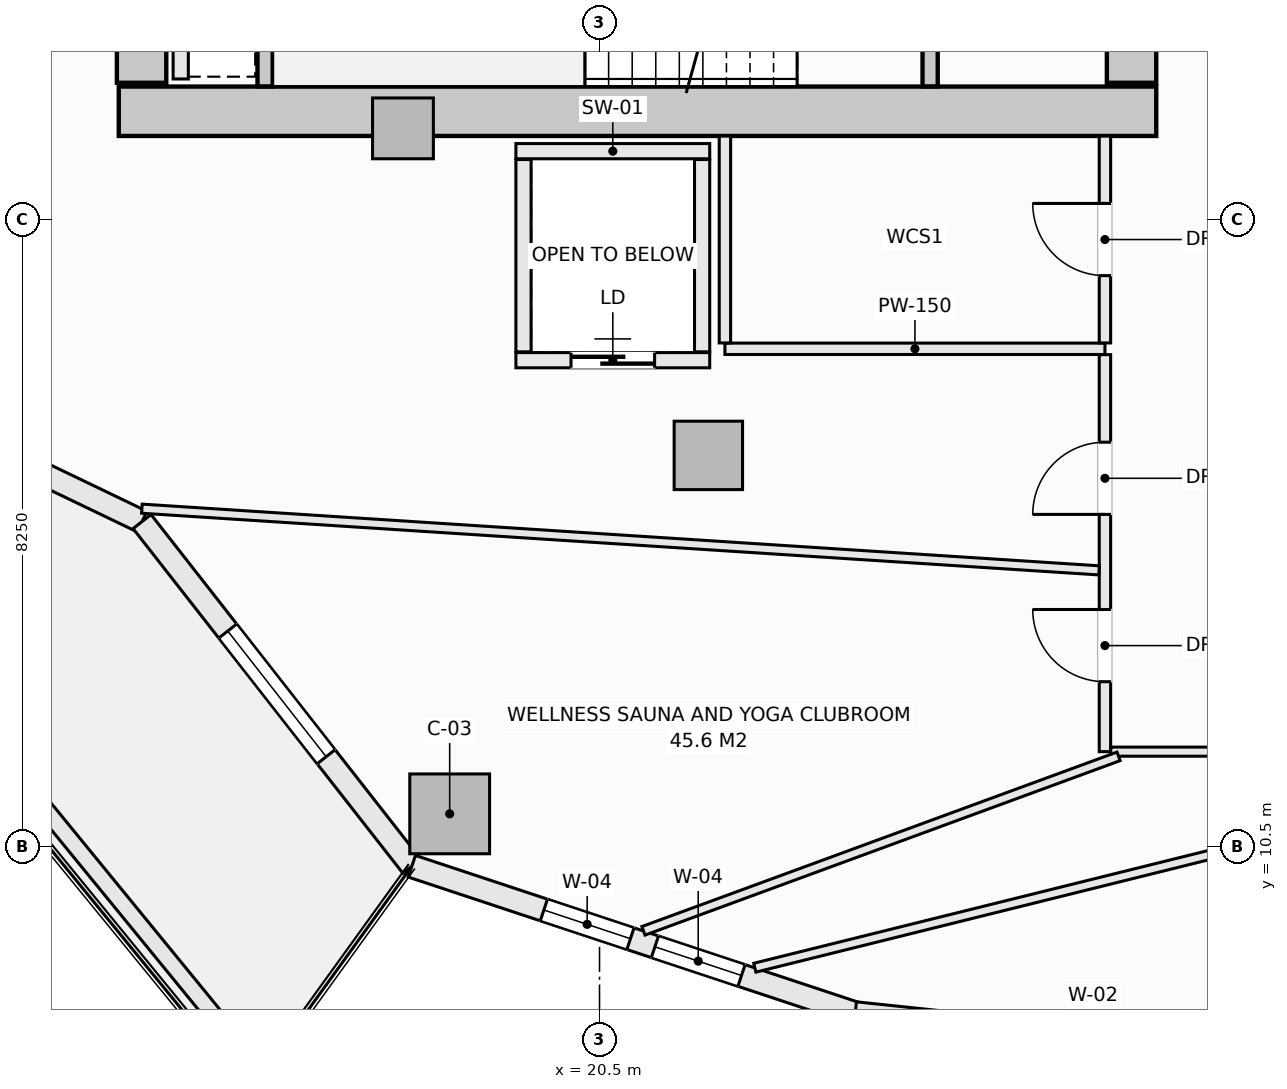
"""IFC4 building model, lengths in metres.
Left out: names, types, materials, properties, quantities, classifications, styles, units other than length and angle.
Written with IfcOpenShell. Run it as: python <this file> out.ifc"""

import sys

from ifc_helpers import new_model, si_unit, direction, frame, frame_2d, origin, origin_2d, place, context, subcontext, project, spatial, rectangle, extrude, element, fill, save


model = new_model("IFC4")
c1 = context("Model", 3, precision=1e-05, world=origin(), true_north=direction((0.0, 1.0)))
c2 = subcontext(c1, "Body", "Model", "MODEL_VIEW")
j1 = project(units=[si_unit("LENGTHUNIT", "METRE"), si_unit("PLANEANGLEUNIT", "RADIAN")], contexts=[c1])
p1 = place(None, origin())
s1 = spatial("IfcSite", under=j1, at=p1, CompositionType="ELEMENT")
p2 = place(p1, origin())
s2 = spatial("IfcBuilding", under=s1, at=p2, CompositionType="ELEMENT")
p3 = place(p2, frame((0.0, 0.0, 132.5)))
s3 = spatial("IfcBuildingStorey", under=s2, at=p3, CompositionType="ELEMENT", Elevation=132.5)
p4 = place(p3, frame((14.175, 20.175, -0.27), z_axis=(0.0, 0.0, 1.0), x_axis=(1.0, 0.0, 0.0)))
e1 = element("IfcWall", 1, at=p4, inside=s3, PredefinedType="SHEAR", context=c2, shape_type="SweptSolid", body=[
    extrude(rectangle(XDim=13.65, YDim=0.65, at=frame_2d((6.825, 0.0))), origin(), (0.0, 0.0, 1.0), 3.4),
])
p5 = place(p3, frame((14.475, 20.55, -0.27), z_axis=(0.0, 0.0, 1.0), x_axis=(0.0, 1.0, 0.0)))
e2 = element("IfcWall", 2, at=p5, inside=s3, PredefinedType="SHEAR", context=c2, shape_type="SweptSolid", body=[
    extrude(rectangle(XDim=12.9, YDim=0.65, at=frame_2d((6.45, 0.0))), origin(), (0.0, 0.0, 1.0), 3.4),
])
p6 = place(p3, frame((27.5, 20.55, -0.27), z_axis=(0.0, 0.0, 1.0), x_axis=(0.0, 1.0, 0.0)))
e3 = element("IfcWall", 3, at=p6, inside=s3, PredefinedType="SHEAR", context=c2, shape_type="SweptSolid", body=[
    extrude(rectangle(XDim=1.5, YDim=0.65, at=frame_2d((0.75, 0.0))), origin(), (0.0, 0.0, 1.0), 3.4),
])
p7 = place(p3, frame((18.529, 10.932, -0.27), z_axis=(0.0, 0.0, 1.0), x_axis=(1.0, 0.0, 0.0)))
e4 = element("IfcColumn", 4, at=p7, inside=s3, PredefinedType="COLUMN", context=c2, shape_type="SweptSolid", body=[
    extrude(rectangle(XDim=1.05, YDim=1.05, at=origin_2d()), origin(), (0.0, 0.0, 1.0), 3.4),
])
p8 = place(p3, frame((21.932, 15.648, -0.27), z_axis=(0.0, 0.0, 1.0), x_axis=(1.0, 0.0, 0.0)))
e5 = element("IfcColumn", 5, at=p8, inside=s3, PredefinedType="COLUMN", context=c2, shape_type="SweptSolid", body=[
    extrude(rectangle(XDim=0.9, YDim=0.9, at=origin_2d()), origin(), (0.0, 0.0, 1.0), 3.4),
])
p9 = place(p3, frame((17.914, 19.95, -0.27), z_axis=(0.0, 0.0, 1.0), x_axis=(1.0, 0.0, 0.0)))
e6 = element("IfcColumn", 6, at=p9, inside=s3, PredefinedType="PILASTER", context=c2, shape_type="SweptSolid", body=[
    extrude(rectangle(XDim=0.8, YDim=0.8, at=origin_2d()), origin(), (0.0, 0.0, 1.0), 3.4),
])
p10 = place(p3, frame((9.178, 17.325, 0.0), z_axis=(0.0, 0.0, 1.0), x_axis=(0.901370184739, -0.433049408339, 0.0)))
e7 = element("IfcWall", 7, at=p10, inside=s3, PredefinedType="SOLIDWALL", context=c2, shape_type="SweptSolid", body=[
    extrude(rectangle(XDim=5.884, YDim=0.3, at=frame_2d((2.942, 0.0))), origin(), (0.0, 0.0, 1.0), 2.653),
])
p11 = place(p10, frame((2.042, 0.0, 0.0)))
e8 = element("IfcOpeningElement", 8, at=p11, cuts=e7, PredefinedType="OPENING", context=c2, shape_type="SweptSolid", body=[
    extrude(rectangle(XDim=1.8, YDim=2.25, at=frame_2d((0.9, 1.125))), frame((0.0, 0.16, 0.0), z_axis=(0.0, -1.0, 0.0), x_axis=(1.0, 0.0, 0.0)), (0.0, 0.0, 1.0), 0.32),
])
p12 = place(p3, frame((14.481, 14.777, 0.0), z_axis=(0.0, 0.0, 1.0), x_axis=(0.616435134162, -0.787405693001, 0.0)))
e9 = element("IfcWall", 9, at=p12, inside=s3, PredefinedType="SOLIDWALL", context=c2, shape_type="SweptSolid", body=[
    extrude(rectangle(XDim=5.759, YDim=0.3, at=frame_2d((2.879, 0.0))), origin(), (0.0, 0.0, 1.0), 2.653),
])
p13 = place(p12, frame((1.829, 0.0, 0.74)))
e10 = element("IfcOpeningElement", 10, at=p13, cuts=e9, PredefinedType="OPENING", context=c2, shape_type="SweptSolid", body=[
    extrude(rectangle(XDim=2.1, YDim=1.7, at=frame_2d((1.05, 0.85))), frame((0.0, 0.16, 0.0), z_axis=(0.0, -1.0, 0.0), x_axis=(1.0, 0.0, 0.0)), (0.0, 0.0, 1.0), 0.32),
])
p14 = place(p3, frame((18.031, 10.242, 0.0), z_axis=(0.0, 0.0, 1.0), x_axis=(0.949238009374, -0.314558741032, 0.0)))
e11 = element("IfcWall", 11, at=p14, inside=s3, PredefinedType="SOLIDWALL", context=c2, shape_type="SweptSolid", body=[
    extrude(rectangle(XDim=6.146, YDim=0.3, at=frame_2d((3.073, 0.0))), origin(), (0.0, 0.0, 1.0), 2.653),
])
p15 = place(p14, frame((1.83, 0.0, 0.74)))
e12 = element("IfcOpeningElement", 12, at=p15, cuts=e11, PredefinedType="OPENING", context=c2, shape_type="SweptSolid", body=[
    extrude(rectangle(XDim=1.2, YDim=1.7, at=frame_2d((0.6, 0.85))), frame((0.0, 0.16, 0.0), z_axis=(0.0, -1.0, 0.0), x_axis=(1.0, 0.0, 0.0)), (0.0, 0.0, 1.0), 0.32),
])
p16 = place(p14, frame((3.369, 0.0, 0.74)))
e13 = element("IfcOpeningElement", 13, at=p16, cuts=e11, PredefinedType="OPENING", context=c2, shape_type="SweptSolid", body=[
    extrude(rectangle(XDim=1.2, YDim=1.7, at=frame_2d((0.6, 0.85))), frame((0.0, 0.16, 0.0), z_axis=(0.0, -1.0, 0.0), x_axis=(1.0, 0.0, 0.0)), (0.0, 0.0, 1.0), 0.32),
])
p17 = place(p3, frame((23.865, 8.309, 0.0), z_axis=(0.0, 0.0, 1.0), x_axis=(0.994498012394, -0.104755445421, 0.0)))
e14 = element("IfcWall", 14, at=p17, inside=s3, PredefinedType="SOLIDWALL", context=c2, shape_type="SweptSolid", body=[
    extrude(rectangle(XDim=6.295, YDim=0.3, at=frame_2d((3.147, 0.0))), origin(), (0.0, 0.0, 1.0), 2.653),
])
p18 = place(p17, frame((2.097, 0.0, 0.74)))
e15 = element("IfcOpeningElement", 15, at=p18, cuts=e14, PredefinedType="OPENING", context=c2, shape_type="SweptSolid", body=[
    extrude(rectangle(XDim=2.1, YDim=1.7, at=frame_2d((1.05, 0.85))), frame((0.0, 0.16, 0.0), z_axis=(0.0, -1.0, 0.0), x_axis=(1.0, 0.0, 0.0)), (0.0, 0.0, 1.0), 0.32),
])
p19 = place(p3, frame((11.791, 12.726, 0.0), z_axis=(0.0, 0.0, 1.0), x_axis=(0.633002467947, -0.77414977593, 0.0)))
e16 = element("IfcWall", 16, at=p19, inside=s3, PredefinedType="PARAPET", context=c2, shape_type="SweptSolid", body=[
    extrude(rectangle(XDim=6.78, YDim=0.22, at=frame_2d((3.39, 0.0))), origin(), (0.0, 0.0, 1.0), 0.52),
])
p20 = place(p3, frame((24.85, 20.502, -0.27), z_axis=(0.0, 0.0, 1.0), x_axis=(0.0, 1.0, 0.0)))
e17 = element("IfcWall", 17, at=p20, inside=s3, PredefinedType="SHEAR", context=c2, shape_type="SweptSolid", body=[
    extrude(rectangle(XDim=3.038, YDim=0.2, at=frame_2d((1.519, 0.0))), origin(), (0.0, 0.0, 1.0), 3.4),
])
p21 = place(p20, frame((0.969, 0.0, 0.27)))
e18 = element("IfcOpeningElement", 18, at=p21, cuts=e17, PredefinedType="OPENING", context=c2, shape_type="SweptSolid", body=[
    extrude(rectangle(XDim=1.1, YDim=2.15, at=frame_2d((0.55, 1.075))), frame((0.0, 0.11, 0.0), z_axis=(0.0, -1.0, 0.0), x_axis=(1.0, 0.0, 0.0)), (0.0, 0.0, 1.0), 0.22),
])
p22 = place(p3, frame((16.1, 20.502, -0.27), z_axis=(0.0, 0.0, 1.0), x_axis=(0.0, 1.0, 0.0)))
e19 = element("IfcWall", 19, at=p22, inside=s3, PredefinedType="SHEAR", context=c2, shape_type="SweptSolid", body=[
    extrude(rectangle(XDim=3.036, YDim=0.2, at=frame_2d((1.518, 0.0))), origin(), (0.0, 0.0, 1.0), 3.4),
])
p23 = place(p3, frame((19.4, 19.65, 0.0), z_axis=(0.0, 0.0, 1.0), x_axis=(1.0, 0.0, 0.0)))
e20 = element("IfcWall", 20, at=p23, inside=s3, PredefinedType="SOLIDWALL", context=c2, shape_type="SweptSolid", body=[
    extrude(rectangle(XDim=2.55, YDim=0.2, at=frame_2d((1.275, 0.0))), origin(), (0.0, 0.0, 1.0), 3.13),
])
p24 = place(p3, frame((19.4, 16.9, 0.0), z_axis=(0.0, 0.0, 1.0), x_axis=(1.0, 0.0, 0.0)))
e21 = element("IfcWall", 21, at=p24, inside=s3, PredefinedType="SOLIDWALL", context=c2, shape_type="SweptSolid", body=[
    extrude(rectangle(XDim=2.55, YDim=0.2, at=frame_2d((1.275, 0.0))), origin(), (0.0, 0.0, 1.0), 3.13),
])
p25 = place(p24, frame((0.725, 0.0, 0.0)))
e22 = element("IfcOpeningElement", 22, at=p25, cuts=e21, PredefinedType="OPENING", context=c2, shape_type="SweptSolid", body=[
    extrude(rectangle(XDim=1.1, YDim=2.2, at=frame_2d((0.55, 1.1))), frame((0.0, 0.11, 0.0), z_axis=(0.0, -1.0, 0.0), x_axis=(1.0, 0.0, 0.0)), (0.0, 0.0, 1.0), 0.22),
])
for number, where, z_axis, x_axis in (
    (23, (19.5, 17.01, 0.0), (0.0, 0.0, 1.0), (0.0, 1.0, 0.0)),
    (24, (21.85, 17.01, 0.0), (0.0, 0.0, 1.0), (0.0, 1.0, 0.0)),
):
    element("IfcWall", number, at=place(p3, frame(where, z_axis=z_axis, x_axis=x_axis)), inside=s3, PredefinedType="SOLIDWALL", context=c2, shape_type="SweptSolid", body=[
        extrude(rectangle(XDim=2.53, YDim=0.2, at=frame_2d((1.265, 0.0))), origin(), (0.0, 0.0, 1.0), 3.13),
    ])
p26 = place(p3, frame((14.99, 20.6, 0.0), z_axis=(0.0, 0.0, 1.0), x_axis=(0.0, 1.0, 0.0)))
e25 = element("IfcWall", 25, at=p26, inside=s3, PredefinedType="SOLIDWALL", context=c2, shape_type="SweptSolid", body=[
    extrude(rectangle(XDim=2.85, YDim=0.2, at=frame_2d((1.425, 0.0))), origin(), (0.0, 0.0, 1.0), 3.13),
])
p27 = place(p3, frame((22.15, 17.05, 0.0), z_axis=(0.0, 0.0, 1.0), x_axis=(1.0, 0.0, 0.0)))
e26 = element("IfcWall", 26, at=p27, inside=s3, PredefinedType="PARTITIONING", context=c2, shape_type="SweptSolid", body=[
    extrude(rectangle(XDim=5.0, YDim=0.15, at=frame_2d((2.5, 0.0))), origin(), (0.0, 0.0, 1.0), 3.13),
])
p28 = place(p3, frame((22.15, 17.127, 0.0), z_axis=(0.0, 0.0, 1.0), x_axis=(0.0, 1.0, 0.0)))
e27 = element("IfcWall", 27, at=p28, inside=s3, PredefinedType="PARTITIONING", context=c2, shape_type="SweptSolid", body=[
    extrude(rectangle(XDim=2.721, YDim=0.15, at=frame_2d((1.36, 0.0))), origin(), (0.0, 0.0, 1.0), 3.13),
])
p29 = place(p3, frame((27.15, 11.75, 0.0), z_axis=(0.0, 0.0, 1.0), x_axis=(0.0, 1.0, 0.0)))
e28 = element("IfcWall", 28, at=p29, inside=s3, PredefinedType="PARTITIONING", context=c2, shape_type="SweptSolid", body=[
    extrude(rectangle(XDim=5.223, YDim=0.15, at=frame_2d((2.611, 0.0))), origin(), (0.0, 0.0, 1.0), 3.13),
])
p30 = place(p29, frame((3.121, 0.0, 0.0)))
e29 = element("IfcOpeningElement", 29, at=p30, cuts=e28, PredefinedType="OPENING", context=c2, shape_type="SweptSolid", body=[
    extrude(rectangle(XDim=0.95, YDim=2.1, at=frame_2d((0.475, 1.05))), frame((0.0, 0.085, 0.0), z_axis=(0.0, -1.0, 0.0), x_axis=(1.0, 0.0, 0.0)), (0.0, 0.0, 1.0), 0.17),
])
p31 = place(p29, frame((0.92, 0.0, 0.0)))
e30 = element("IfcOpeningElement", 30, at=p31, cuts=e28, PredefinedType="OPENING", context=c2, shape_type="SweptSolid", body=[
    extrude(rectangle(XDim=0.95, YDim=2.1, at=frame_2d((0.475, 1.05))), frame((0.0, 0.085, 0.0), z_axis=(0.0, -1.0, 0.0), x_axis=(1.0, 0.0, 0.0)), (0.0, 0.0, 1.0), 0.17),
])
p32 = place(p3, frame((27.15, 17.127, 0.0), z_axis=(0.0, 0.0, 1.0), x_axis=(0.0, 1.0, 0.0)))
e31 = element("IfcWall", 31, at=p32, inside=s3, PredefinedType="PARTITIONING", context=c2, shape_type="SweptSolid", body=[
    extrude(rectangle(XDim=2.721, YDim=0.15, at=frame_2d((1.36, 0.0))), origin(), (0.0, 0.0, 1.0), 3.13),
])
p33 = place(p32, frame((0.885, 0.0, 0.0)))
e32 = element("IfcOpeningElement", 32, at=p33, cuts=e31, PredefinedType="OPENING", context=c2, shape_type="SweptSolid", body=[
    extrude(rectangle(XDim=0.95, YDim=2.1, at=frame_2d((0.475, 1.05))), frame((0.0, 0.085, 0.0), z_axis=(0.0, -1.0, 0.0), x_axis=(1.0, 0.0, 0.0)), (0.0, 0.0, 1.0), 0.17),
])
p34 = place(p3, frame((27.227, 11.75, 0.0), z_axis=(0.0, 0.0, 1.0), x_axis=(1.0, 0.0, 0.0)))
e33 = element("IfcWall", 33, at=p34, inside=s3, PredefinedType="PARTITIONING", context=c2, shape_type="SweptSolid", body=[
    extrude(rectangle(XDim=8.661, YDim=0.12, at=frame_2d((4.331, 0.0))), origin(), (0.0, 0.0, 1.0), 3.13),
])
p35 = place(p34, frame((6.659, 0.0, 0.0)))
e34 = element("IfcOpeningElement", 34, at=p35, cuts=e33, PredefinedType="OPENING", context=c2, shape_type="SweptSolid", body=[
    extrude(rectangle(XDim=0.95, YDim=2.1, at=frame_2d((0.475, 1.05))), frame((0.0, 0.07, 0.0), z_axis=(0.0, -1.0, 0.0), x_axis=(1.0, 0.0, 0.0)), (0.0, 0.0, 1.0), 0.14),
])
p36 = place(p3, frame((14.479, 14.947, 0.0), z_axis=(0.0, 0.0, 1.0), x_axis=(0.997930277746, -0.064305215633, 0.0)))
e35 = element("IfcWall", 35, at=p36, inside=s3, PredefinedType="PARTITIONING", context=c2, shape_type="SweptSolid", body=[
    extrude(rectangle(XDim=12.62, YDim=0.12, at=frame_2d((6.31, 0.0))), origin(), (0.0, 0.0, 1.0), 2.812),
])
p37 = place(p3, frame((21.078, 9.393, 0.0), z_axis=(0.0, 0.0, 1.0), x_axis=(0.938728109135, 0.344658580511, 0.0)))
e36 = element("IfcWall", 36, at=p37, inside=s3, PredefinedType="PARTITIONING", context=c2, shape_type="SweptSolid", body=[
    extrude(rectangle(XDim=6.659, YDim=0.12, at=frame_2d((3.33, 0.0))), origin(), (0.0, 0.0, 1.0), 2.653),
])
p38 = place(p3, frame((22.543, 8.907, 0.0), z_axis=(0.0, 0.0, 1.0), x_axis=(0.970574423873, 0.240801344938, 0.0)))
e37 = element("IfcWall", 37, at=p38, inside=s3, PredefinedType="PARTITIONING", context=c2, shape_type="SweptSolid", body=[
    extrude(rectangle(XDim=11.298, YDim=0.12, at=frame_2d((5.649, 0.0))), origin(), (0.0, 0.0, 1.0), 2.653),
])
p39 = place(p13, origin())
e38 = element("IfcWindow", 38, at=p39, inside=s3, PartitioningType="SINGLE_PANEL", PredefinedType="WINDOW", context=c2, shape_type="SweptSolid", body=[
    extrude(rectangle(XDim=2.1, YDim=1.7, at=frame_2d((1.05, 0.85))), frame((0.0, 0.03, 0.0), z_axis=(0.0, -1.0, 0.0), x_axis=(1.0, 0.0, 0.0)), (0.0, 0.0, 1.0), 0.06),
])
fill(e10, e38)
p40 = place(p15, origin())
e39 = element("IfcWindow", 39, at=p40, inside=s3, PartitioningType="SINGLE_PANEL", PredefinedType="WINDOW", context=c2, shape_type="SweptSolid", body=[
    extrude(rectangle(XDim=1.2, YDim=1.7, at=frame_2d((0.6, 0.85))), frame((0.0, 0.03, 0.0), z_axis=(0.0, -1.0, 0.0), x_axis=(1.0, 0.0, 0.0)), (0.0, 0.0, 1.0), 0.06),
])
fill(e12, e39)
p41 = place(p25, origin())
e40 = element("IfcDoor", 40, at=p41, inside=s3, OperationType="SLIDING_TO_LEFT", PredefinedType="DOOR", context=c2, shape_type="SweptSolid", body=[
    extrude(rectangle(XDim=1.1, YDim=2.2, at=frame_2d((0.55, 1.1))), frame((0.0, 0.025, 0.0), z_axis=(0.0, -1.0, 0.0), x_axis=(1.0, 0.0, 0.0)), (0.0, 0.0, 1.0), 0.05),
])
fill(e22, e40)
p42 = place(p33, origin())
e41 = element("IfcDoor", 41, at=p42, inside=s3, OperationType="SINGLE_SWING_RIGHT", PredefinedType="DOOR", context=c2, shape_type="SweptSolid", body=[
    extrude(rectangle(XDim=0.95, YDim=2.1, at=frame_2d((0.475, 1.05))), frame((0.0, 0.025, 0.0), z_axis=(0.0, -1.0, 0.0), x_axis=(1.0, 0.0, 0.0)), (0.0, 0.0, 1.0), 0.05),
])
fill(e32, e41)
p43 = place(p30, origin())
e42 = element("IfcDoor", 42, at=p43, inside=s3, OperationType="SINGLE_SWING_LEFT", PredefinedType="DOOR", context=c2, shape_type="SweptSolid", body=[
    extrude(rectangle(XDim=0.95, YDim=2.1, at=frame_2d((0.475, 1.05))), frame((0.0, 0.025, 0.0), z_axis=(0.0, -1.0, 0.0), x_axis=(1.0, 0.0, 0.0)), (0.0, 0.0, 1.0), 0.05),
])
fill(e29, e42)
p44 = place(p31, origin())
e43 = element("IfcDoor", 43, at=p44, inside=s3, OperationType="SINGLE_SWING_RIGHT", PredefinedType="DOOR", context=c2, shape_type="SweptSolid", body=[
    extrude(rectangle(XDim=0.95, YDim=2.1, at=frame_2d((0.475, 1.05))), frame((0.0, 0.025, 0.0), z_axis=(0.0, -1.0, 0.0), x_axis=(1.0, 0.0, 0.0)), (0.0, 0.0, 1.0), 0.05),
])
fill(e30, e43)
p45 = place(p16, origin())
e44 = element("IfcWindow", 44, at=p45, inside=s3, PartitioningType="SINGLE_PANEL", PredefinedType="WINDOW", context=c2, shape_type="SweptSolid", body=[
    extrude(rectangle(XDim=1.2, YDim=1.7, at=frame_2d((0.6, 0.85))), frame((0.0, 0.03, 0.0), z_axis=(0.0, -1.0, 0.0), x_axis=(1.0, 0.0, 0.0)), (0.0, 0.0, 1.0), 0.06),
])
fill(e13, e44)
save(model, sys.argv[1])
